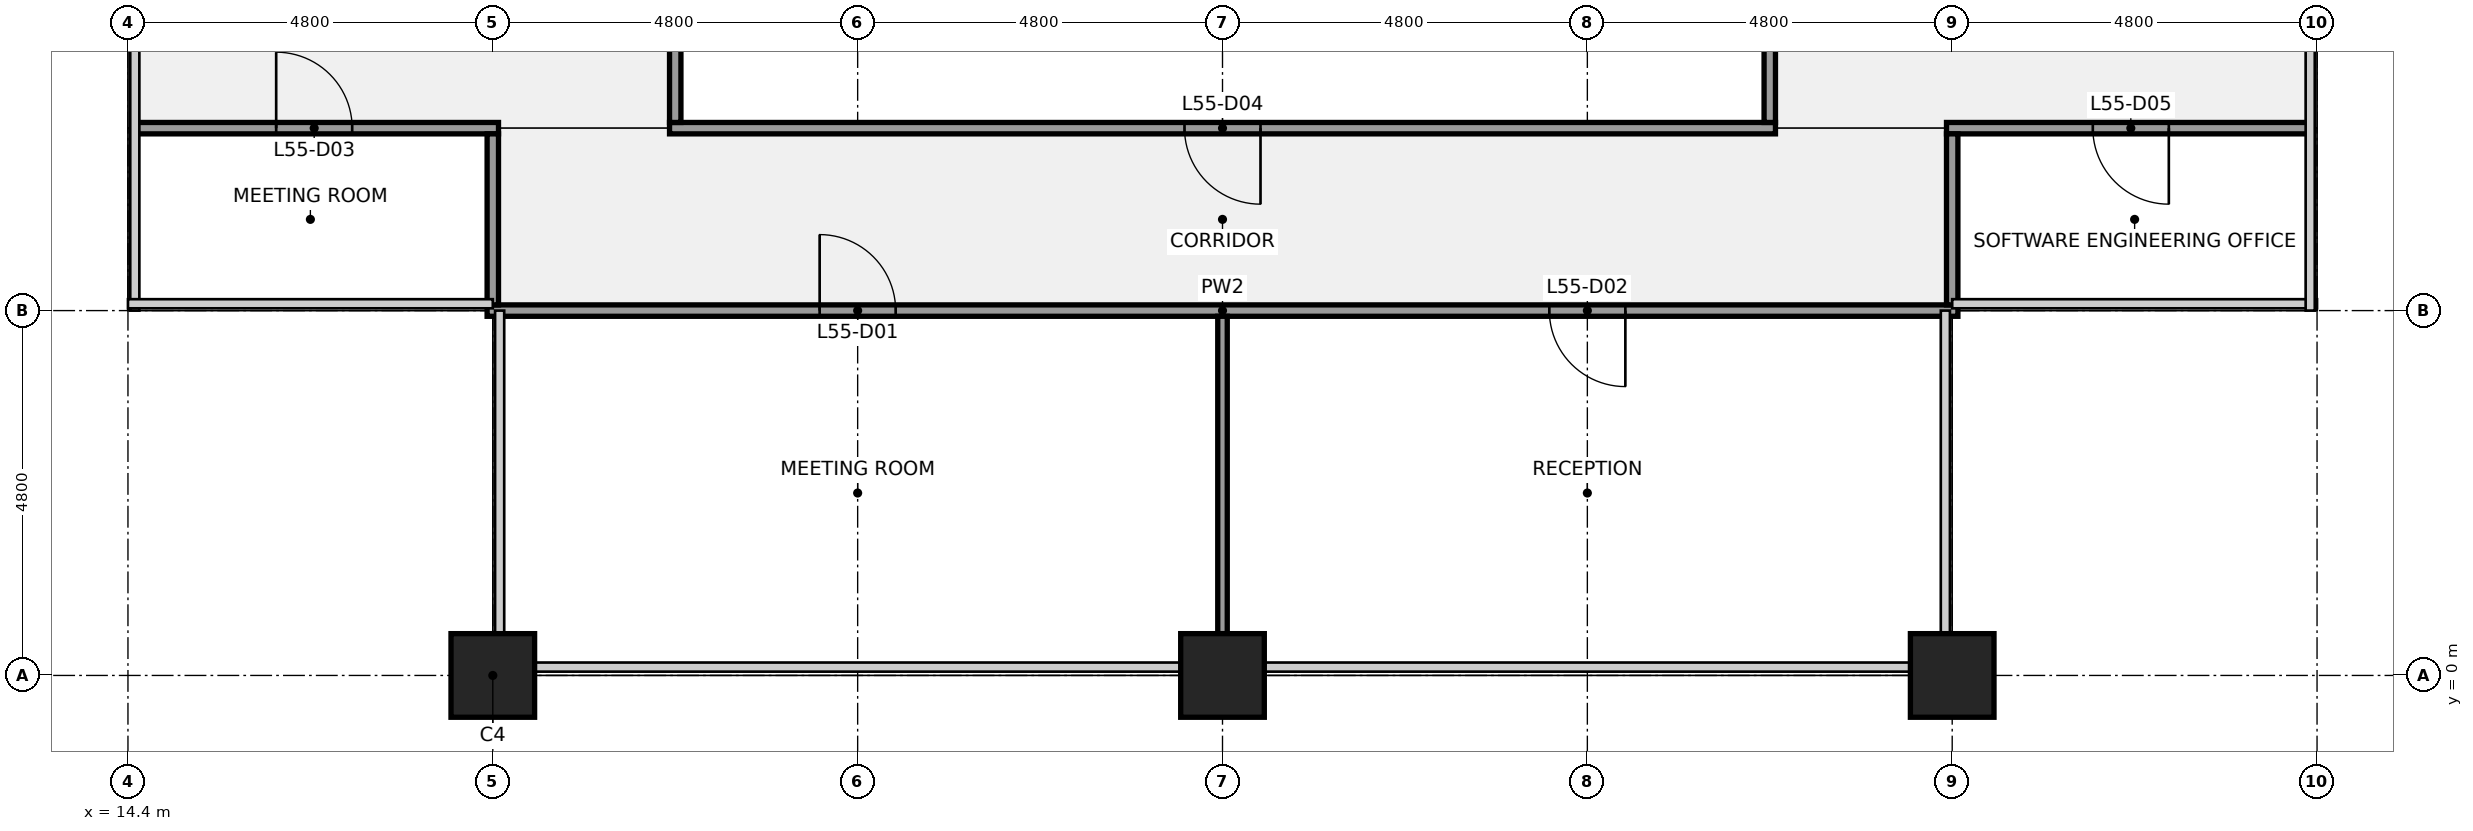
"""IFC4 building model, lengths in metres.
Left out: names, types, materials, properties, quantities, classifications, styles, units other than length and angle.
Written with IfcOpenShell. Run it as: python <this file> out.ifc"""

import sys

from ifc_helpers import new_model, si_unit, direction, frame, frame_2d, origin, origin_2d, place, context, subcontext, project, spatial, rectangle, extrude, element, fill, save


model = new_model("IFC4")
c1 = context("Model", 3, precision=1e-05, world=origin(), true_north=direction((0.0, 1.0)))
c2 = subcontext(c1, "Body", "Model", "MODEL_VIEW")
j1 = project(units=[si_unit("LENGTHUNIT", "METRE"), si_unit("PLANEANGLEUNIT", "RADIAN")], contexts=[c1])
p1 = place(None, origin())
s1 = spatial("IfcSite", under=j1, at=p1, CompositionType="ELEMENT")
p2 = place(p1, origin())
s2 = spatial("IfcBuilding", under=s1, at=p2, CompositionType="ELEMENT")
p3 = place(p2, frame((0.0, 0.0, 249.2)))
s3 = spatial("IfcBuildingStorey", under=s2, at=p3, CompositionType="ELEMENT", Elevation=249.2)
for number, where, z_axis, x_axis in (
    (1, (19.2, 0.0, 0.0), (0.0, 0.0, 1.0), (1.0, 0.0, 0.0)),
    (2, (28.8, 0.0, 0.0), (0.0, 0.0, 1.0), (1.0, 0.0, 0.0)),
    (3, (38.4, 0.0, 0.0), (0.0, 0.0, 1.0), (1.0, 0.0, 0.0)),
):
    element("IfcColumn", number, at=place(p3, frame(where, z_axis=z_axis, x_axis=x_axis)), inside=s3, PredefinedType="COLUMN", context=c2, shape_type="SweptSolid", body=[
        extrude(rectangle(XDim=1.1, YDim=1.1, at=origin_2d()), origin(), (0.0, 0.0, 1.0), 4.0),
    ])
p4 = place(p3, frame((19.125, 4.8, 0.0), z_axis=(0.0, 0.0, 1.0), x_axis=(1.0, 0.0, 0.0)))
e4 = element("IfcWall", 4, at=p4, inside=s3, PredefinedType="PARTITIONING", context=c2, shape_type="SweptSolid", body=[
    extrude(rectangle(XDim=19.35, YDim=0.15, at=frame_2d((9.675, 0.0))), origin(), (0.0, 0.0, 1.0), 2.87),
])
p5 = place(p4, frame((4.375, 0.0, 0.0)))
e5 = element("IfcOpeningElement", 5, at=p5, cuts=e4, PredefinedType="OPENING", context=c2, shape_type="SweptSolid", body=[
    extrude(rectangle(XDim=1.0, YDim=2.1, at=frame_2d((0.5, 1.05))), frame((0.0, 0.085, 0.0), z_axis=(0.0, -1.0, 0.0), x_axis=(1.0, 0.0, 0.0)), (0.0, 0.0, 1.0), 0.17),
])
p6 = place(p4, frame((13.975, 0.0, 0.0)))
e6 = element("IfcOpeningElement", 6, at=p6, cuts=e4, PredefinedType="OPENING", context=c2, shape_type="SweptSolid", body=[
    extrude(rectangle(XDim=1.0, YDim=2.1, at=frame_2d((0.5, 1.05))), frame((0.0, 0.085, 0.0), z_axis=(0.0, -1.0, 0.0), x_axis=(1.0, 0.0, 0.0)), (0.0, 0.0, 1.0), 0.17),
])
p7 = place(p3, frame((14.5, 7.2, 0.0), z_axis=(0.0, 0.0, 1.0), x_axis=(1.0, 0.0, 0.0)))
e7 = element("IfcWall", 7, at=p7, inside=s3, PredefinedType="PARTITIONING", context=c2, shape_type="SweptSolid", body=[
    extrude(rectangle(XDim=4.775, YDim=0.15, at=frame_2d((2.387, 0.0))), origin(), (0.0, 0.0, 1.0), 2.87),
])
p8 = place(p7, frame((1.85, 0.0, 0.0)))
e8 = element("IfcOpeningElement", 8, at=p8, cuts=e7, PredefinedType="OPENING", context=c2, shape_type="SweptSolid", body=[
    extrude(rectangle(XDim=1.0, YDim=2.1, at=frame_2d((0.5, 1.05))), frame((0.0, 0.085, 0.0), z_axis=(0.0, -1.0, 0.0), x_axis=(1.0, 0.0, 0.0)), (0.0, 0.0, 1.0), 0.17),
])
p9 = place(p3, frame((21.525, 7.2, 0.0), z_axis=(0.0, 0.0, 1.0), x_axis=(1.0, 0.0, 0.0)))
e9 = element("IfcWall", 9, at=p9, inside=s3, PredefinedType="PARTITIONING", context=c2, shape_type="SweptSolid", body=[
    extrude(rectangle(XDim=14.55, YDim=0.15, at=frame_2d((7.275, 0.0))), origin(), (0.0, 0.0, 1.0), 2.87),
])
p10 = place(p9, frame((6.775, 0.0, 0.0)))
e10 = element("IfcOpeningElement", 10, at=p10, cuts=e9, PredefinedType="OPENING", context=c2, shape_type="SweptSolid", body=[
    extrude(rectangle(XDim=1.0, YDim=2.1, at=frame_2d((0.5, 1.05))), frame((0.0, 0.085, 0.0), z_axis=(0.0, -1.0, 0.0), x_axis=(1.0, 0.0, 0.0)), (0.0, 0.0, 1.0), 0.17),
])
p11 = place(p3, frame((38.325, 7.2, 0.0), z_axis=(0.0, 0.0, 1.0), x_axis=(1.0, 0.0, 0.0)))
e11 = element("IfcWall", 11, at=p11, inside=s3, PredefinedType="PARTITIONING", context=c2, shape_type="SweptSolid", body=[
    extrude(rectangle(XDim=4.775, YDim=0.15, at=frame_2d((2.388, 0.0))), origin(), (0.0, 0.0, 1.0), 2.87),
])
p12 = place(p11, frame((1.925, 0.0, 0.0)))
e12 = element("IfcOpeningElement", 12, at=p12, cuts=e11, PredefinedType="OPENING", context=c2, shape_type="SweptSolid", body=[
    extrude(rectangle(XDim=1.0, YDim=2.1, at=frame_2d((0.5, 1.05))), frame((0.0, 0.085, 0.0), z_axis=(0.0, -1.0, 0.0), x_axis=(1.0, 0.0, 0.0)), (0.0, 0.0, 1.0), 0.17),
])
p13 = place(p3, frame((19.2, 4.875, 0.0), z_axis=(0.0, 0.0, 1.0), x_axis=(0.0, 1.0, 0.0)))
e13 = element("IfcWall", 13, at=p13, inside=s3, PredefinedType="PARTITIONING", context=c2, shape_type="SweptSolid", body=[
    extrude(rectangle(XDim=2.25, YDim=0.15, at=frame_2d((1.125, 0.0))), origin(), (0.0, 0.0, 1.0), 2.87),
])
p14 = place(p3, frame((21.6, 7.275, 0.0), z_axis=(0.0, 0.0, 1.0), x_axis=(0.0, 1.0, 0.0)))
e14 = element("IfcWall", 14, at=p14, inside=s3, PredefinedType="PARTITIONING", context=c2, shape_type="SweptSolid", body=[
    extrude(rectangle(XDim=3.463, YDim=0.15, at=frame_2d((1.731, 0.0))), origin(), (0.0, 0.0, 1.0), 2.87),
])
p15 = place(p3, frame((28.8, 0.55, 0.0), z_axis=(0.0, 0.0, 1.0), x_axis=(0.0, 1.0, 0.0)))
e15 = element("IfcWall", 15, at=p15, inside=s3, PredefinedType="PARTITIONING", context=c2, shape_type="SweptSolid", body=[
    extrude(rectangle(XDim=4.175, YDim=0.125, at=frame_2d((2.087, 0.0))), origin(), (0.0, 0.0, 1.0), 2.87),
])
p16 = place(p3, frame((36.0, 7.275, 0.0), z_axis=(0.0, 0.0, 1.0), x_axis=(0.0, 1.0, 0.0)))
e16 = element("IfcWall", 16, at=p16, inside=s3, PredefinedType="PARTITIONING", context=c2, shape_type="SweptSolid", body=[
    extrude(rectangle(XDim=3.463, YDim=0.15, at=frame_2d((1.731, 0.0))), origin(), (0.0, 0.0, 1.0), 2.87),
])
p17 = place(p3, frame((38.4, 4.875, 0.0), z_axis=(0.0, 0.0, 1.0), x_axis=(0.0, 1.0, 0.0)))
e17 = element("IfcWall", 17, at=p17, inside=s3, PredefinedType="PARTITIONING", context=c2, shape_type="SweptSolid", body=[
    extrude(rectangle(XDim=2.25, YDim=0.15, at=frame_2d((1.125, 0.0))), origin(), (0.0, 0.0, 1.0), 2.87),
])
for number, where, z_axis, x_axis in (
    (18, (19.2, -1.025, 0.0), (0.0, 0.0, 1.0), (1.0, 0.0, 0.0)),
    (19, (38.4, -1.025, 0.0), (0.0, 0.0, 1.0), (1.0, 0.0, 0.0)),
):
    element("IfcColumn", number, at=place(p3, frame(where, z_axis=z_axis, x_axis=x_axis)), inside=s3, PredefinedType="PILASTER", context=c2, shape_type="SweptSolid", body=[
        extrude(rectangle(XDim=2.4, YDim=0.95, at=origin_2d()), origin(), (0.0, 0.0, 1.0), 4.0),
    ])
p18 = place(p5, origin())
e20 = element("IfcDoor", 20, at=p18, inside=s3, OperationType="SINGLE_SWING_LEFT", PredefinedType="DOOR", context=c2, shape_type="SweptSolid", body=[
    extrude(rectangle(XDim=1.0, YDim=2.1, at=frame_2d((0.5, 1.05))), frame((0.0, 0.025, 0.0), z_axis=(0.0, -1.0, 0.0), x_axis=(1.0, 0.0, 0.0)), (0.0, 0.0, 1.0), 0.05),
])
fill(e5, e20)
p19 = place(p6, origin())
e21 = element("IfcDoor", 21, at=p19, inside=s3, OperationType="SINGLE_SWING_RIGHT", PredefinedType="DOOR", context=c2, shape_type="SweptSolid", body=[
    extrude(rectangle(XDim=1.0, YDim=2.1, at=frame_2d((0.5, 1.05))), frame((0.0, 0.025, 0.0), z_axis=(0.0, -1.0, 0.0), x_axis=(1.0, 0.0, 0.0)), (0.0, 0.0, 1.0), 0.05),
])
fill(e6, e21)
p20 = place(p8, origin())
e22 = element("IfcDoor", 22, at=p20, inside=s3, OperationType="SINGLE_SWING_LEFT", PredefinedType="DOOR", context=c2, shape_type="SweptSolid", body=[
    extrude(rectangle(XDim=1.0, YDim=2.1, at=frame_2d((0.5, 1.05))), frame((0.0, 0.025, 0.0), z_axis=(0.0, -1.0, 0.0), x_axis=(1.0, 0.0, 0.0)), (0.0, 0.0, 1.0), 0.05),
])
fill(e8, e22)
p21 = place(p10, origin())
e23 = element("IfcDoor", 23, at=p21, inside=s3, OperationType="SINGLE_SWING_RIGHT", PredefinedType="DOOR", context=c2, shape_type="SweptSolid", body=[
    extrude(rectangle(XDim=1.0, YDim=2.1, at=frame_2d((0.5, 1.05))), frame((0.0, 0.025, 0.0), z_axis=(0.0, -1.0, 0.0), x_axis=(1.0, 0.0, 0.0)), (0.0, 0.0, 1.0), 0.05),
])
fill(e10, e23)
p22 = place(p12, origin())
e24 = element("IfcDoor", 24, at=p22, inside=s3, OperationType="SINGLE_SWING_RIGHT", PredefinedType="DOOR", context=c2, shape_type="SweptSolid", body=[
    extrude(rectangle(XDim=1.0, YDim=2.1, at=frame_2d((0.5, 1.05))), frame((0.0, 0.025, 0.0), z_axis=(0.0, -1.0, 0.0), x_axis=(1.0, 0.0, 0.0)), (0.0, 0.0, 1.0), 0.05),
])
fill(e12, e24)
save(model, sys.argv[1])
